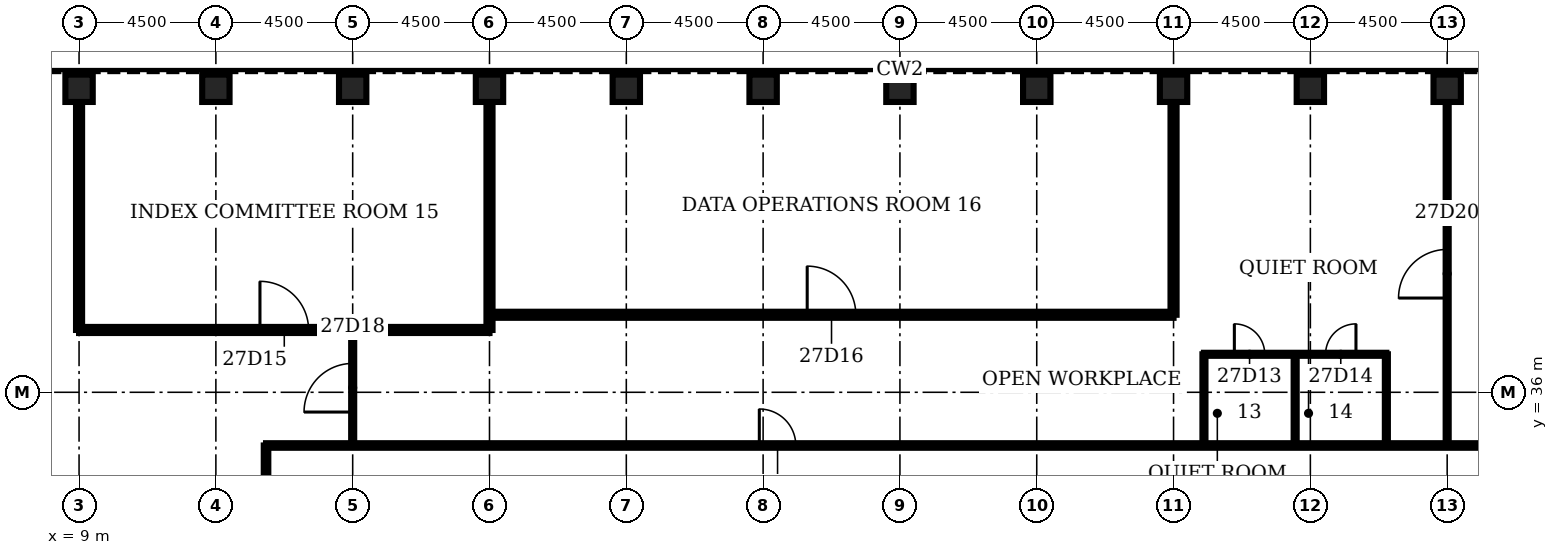
"""IFC4 building model, lengths in metres.
Left out: names, types, materials, properties, quantities, classifications, styles, units other than length and angle.
Written with IfcOpenShell. Run it as: python <this file> out.ifc"""

import sys

from ifc_helpers import new_model, si_unit, direction, frame, frame_2d, origin, origin_2d, place, context, subcontext, project, spatial, rectangle, hollow_rectangle, extrude, element, fill, save


model = new_model("IFC4")
c1 = context("Model", 3, precision=1e-05, world=origin(), true_north=direction((0.0, 1.0)))
c2 = subcontext(c1, "Body", "Model", "MODEL_VIEW")
j1 = project(units=[si_unit("LENGTHUNIT", "METRE"), si_unit("PLANEANGLEUNIT", "RADIAN")], contexts=[c1])
p1 = place(None, origin())
s1 = spatial("IfcSite", under=j1, at=p1, CompositionType="ELEMENT")
p2 = place(p1, origin())
s2 = spatial("IfcBuilding", under=s1, at=p2, CompositionType="ELEMENT")
p3 = place(p2, frame((0.0, 0.0, 125.7)))
s3 = spatial("IfcBuildingStorey", under=s2, at=p3, CompositionType="ELEMENT", Elevation=125.7)
for number, where, z_axis, x_axis in (
    (1, (54.0, 46.0, 0.0), (0.0, 0.0, 1.0), (0.0, 1.0, 0.0)),
    (2, (49.5, 46.0, 0.0), (0.0, 0.0, 1.0), (0.0, 1.0, 0.0)),
    (3, (45.0, 46.0, 0.0), (0.0, 0.0, 1.0), (0.0, 1.0, 0.0)),
    (4, (40.5, 46.0, 0.0), (0.0, 0.0, 1.0), (0.0, 1.0, 0.0)),
    (5, (36.0, 46.0, 0.0), (0.0, 0.0, 1.0), (0.0, 1.0, 0.0)),
    (6, (31.5, 46.0, 0.0), (0.0, 0.0, 1.0), (0.0, 1.0, 0.0)),
    (7, (27.0, 46.0, 0.0), (0.0, 0.0, 1.0), (0.0, 1.0, 0.0)),
    (8, (22.5, 46.0, 0.0), (0.0, 0.0, 1.0), (0.0, 1.0, 0.0)),
    (9, (18.0, 46.0, 0.0), (0.0, 0.0, 1.0), (0.0, 1.0, 0.0)),
    (10, (13.5, 46.0, 0.0), (0.0, 0.0, 1.0), (0.0, 1.0, 0.0)),
    (11, (9.0, 46.0, 0.0), (0.0, 0.0, 1.0), (0.0, 1.0, 0.0)),
):
    element("IfcColumn", number, at=place(p3, frame(where, z_axis=z_axis, x_axis=x_axis)), inside=s3, PredefinedType="COLUMN", context=c2, shape_type="SweptSolid", body=[
        extrude(hollow_rectangle(XDim=0.9, YDim=0.9, WallThickness=0.1, at=origin_2d()), origin(), (0.0, 0.0, 1.0), 4.2),
    ])
p4 = place(p3, frame((15.15, 34.25, 0.0), z_axis=(0.0, 0.0, 1.0), x_axis=(1.0, 0.0, 0.0)))
e12 = element("IfcWall", 12, at=p4, inside=s3, PredefinedType="PARTITIONING", context=c2, shape_type="SweptSolid", body=[
    extrude(rectangle(XDim=41.7, YDim=0.15, at=frame_2d((20.85, 0.0))), origin(), (0.0, 0.0, 1.0), 3.0),
])
p5 = place(p4, frame((16.225, 0.0, 0.0)))
e13 = element("IfcOpeningElement", 13, at=p5, cuts=e12, PredefinedType="OPENING", context=c2, shape_type="SweptSolid", body=[
    extrude(rectangle(XDim=1.2, YDim=2.1, at=frame_2d((0.6, 1.05))), frame((0.0, 0.085, 0.0), z_axis=(0.0, -1.0, 0.0), x_axis=(1.0, 0.0, 0.0)), (0.0, 0.0, 1.0), 0.17),
])
p6 = place(p3, frame((46.0, 37.25, 0.0), z_axis=(0.0, 0.0, 1.0), x_axis=(1.0, 0.0, 0.0)))
e14 = element("IfcWall", 14, at=p6, inside=s3, PredefinedType="PARTITIONING", context=c2, shape_type="SweptSolid", body=[
    extrude(rectangle(XDim=6.0, YDim=0.1, at=frame_2d((3.0, 0.0))), origin(), (0.0, 0.0, 1.0), 3.0),
])
p7 = place(p6, frame((1.0, 0.0, 0.0)))
e15 = element("IfcOpeningElement", 15, at=p7, cuts=e14, PredefinedType="OPENING", context=c2, shape_type="SweptSolid", body=[
    extrude(rectangle(XDim=1.0, YDim=2.1, at=frame_2d((0.5, 1.05))), frame((0.0, 0.06, 0.0), z_axis=(0.0, -1.0, 0.0), x_axis=(1.0, 0.0, 0.0)), (0.0, 0.0, 1.0), 0.12),
])
p8 = place(p6, frame((4.0, 0.0, 0.0)))
e16 = element("IfcOpeningElement", 16, at=p8, cuts=e14, PredefinedType="OPENING", context=c2, shape_type="SweptSolid", body=[
    extrude(rectangle(XDim=1.0, YDim=2.1, at=frame_2d((0.5, 1.05))), frame((0.0, 0.06, 0.0), z_axis=(0.0, -1.0, 0.0), x_axis=(1.0, 0.0, 0.0)), (0.0, 0.0, 1.0), 0.12),
])
p9 = place(p3, frame((9.0, 38.05, 0.0), z_axis=(0.0, 0.0, 1.0), x_axis=(1.0, 0.0, 0.0)))
e17 = element("IfcWall", 17, at=p9, inside=s3, PredefinedType="PARTITIONING", context=c2, shape_type="SweptSolid", body=[
    extrude(rectangle(XDim=13.5, YDim=0.2, at=frame_2d((6.75, 0.0))), origin(), (0.0, 0.0, 1.0), 3.0),
])
p10 = place(p9, frame((5.95, 0.0, 0.0)))
e18 = element("IfcOpeningElement", 18, at=p10, cuts=e17, PredefinedType="OPENING", context=c2, shape_type="SweptSolid", body=[
    extrude(rectangle(XDim=1.6, YDim=2.1, at=frame_2d((0.8, 1.05))), frame((0.0, 0.11, 0.0), z_axis=(0.0, -1.0, 0.0), x_axis=(1.0, 0.0, 0.0)), (0.0, 0.0, 1.0), 0.22),
])
p11 = place(p3, frame((22.5, 38.55, 0.0), z_axis=(0.0, 0.0, 1.0), x_axis=(1.0, 0.0, 0.0)))
e19 = element("IfcWall", 19, at=p11, inside=s3, PredefinedType="PARTITIONING", context=c2, shape_type="SweptSolid", body=[
    extrude(rectangle(XDim=22.5, YDim=0.2, at=frame_2d((11.25, 0.0))), origin(), (0.0, 0.0, 1.0), 3.0),
])
p12 = place(p11, frame((10.45, 0.0, 0.0)))
e20 = element("IfcOpeningElement", 20, at=p12, cuts=e19, PredefinedType="OPENING", context=c2, shape_type="SweptSolid", body=[
    extrude(rectangle(XDim=1.6, YDim=2.1, at=frame_2d((0.8, 1.05))), frame((0.0, 0.11, 0.0), z_axis=(0.0, -1.0, 0.0), x_axis=(1.0, 0.0, 0.0)), (0.0, 0.0, 1.0), 0.22),
])
p13 = place(p3, frame((9.0, 38.05, 0.0), z_axis=(0.0, 0.0, 1.0), x_axis=(0.0, 1.0, 0.0)))
e21 = element("IfcWall", 21, at=p13, inside=s3, PredefinedType="PARTITIONING", context=c2, shape_type="SweptSolid", body=[
    extrude(rectangle(XDim=7.5, YDim=0.2, at=frame_2d((3.75, 0.0))), origin(), (0.0, 0.0, 1.0), 3.0),
])
p14 = place(p3, frame((15.15, 13.75, 0.0), z_axis=(0.0, 0.0, 1.0), x_axis=(0.0, 1.0, 0.0)))
e22 = element("IfcWall", 22, at=p14, inside=s3, PredefinedType="PARTITIONING", context=c2, shape_type="SweptSolid", body=[
    extrude(rectangle(XDim=20.5, YDim=0.15, at=frame_2d((10.25, 0.0))), origin(), (0.0, 0.0, 1.0), 3.0),
])
p15 = place(p14, frame((9.65, 0.0, 0.0)))
e23 = element("IfcOpeningElement", 23, at=p15, cuts=e22, PredefinedType="OPENING", context=c2, shape_type="SweptSolid", body=[
    extrude(rectangle(XDim=1.2, YDim=2.1, at=frame_2d((0.6, 1.05))), frame((0.0, 0.085, 0.0), z_axis=(0.0, -1.0, 0.0), x_axis=(1.0, 0.0, 0.0)), (0.0, 0.0, 1.0), 0.17),
])
p16 = place(p3, frame((18.0, 34.25, 0.0), z_axis=(0.0, 0.0, 1.0), x_axis=(0.0, 1.0, 0.0)))
e24 = element("IfcWall", 24, at=p16, inside=s3, PredefinedType="PARTITIONING", context=c2, shape_type="SweptSolid", body=[
    extrude(rectangle(XDim=3.8, YDim=0.1, at=frame_2d((1.9, 0.0))), origin(), (0.0, 0.0, 1.0), 3.0),
])
p17 = place(p16, frame((1.1, 0.0, 0.0)))
e25 = element("IfcOpeningElement", 25, at=p17, cuts=e24, PredefinedType="OPENING", context=c2, shape_type="SweptSolid", body=[
    extrude(rectangle(XDim=1.6, YDim=2.1, at=frame_2d((0.8, 1.05))), frame((0.0, 0.06, 0.0), z_axis=(0.0, -1.0, 0.0), x_axis=(1.0, 0.0, 0.0)), (0.0, 0.0, 1.0), 0.12),
])
p18 = place(p3, frame((22.5, 38.05, 0.0), z_axis=(0.0, 0.0, 1.0), x_axis=(0.0, 1.0, 0.0)))
e26 = element("IfcWall", 26, at=p18, inside=s3, PredefinedType="PARTITIONING", context=c2, shape_type="SweptSolid", body=[
    extrude(rectangle(XDim=7.5, YDim=0.2, at=frame_2d((3.75, 0.0))), origin(), (0.0, 0.0, 1.0), 3.0),
])
p19 = place(p3, frame((45.0, 38.55, 0.0), z_axis=(0.0, 0.0, 1.0), x_axis=(0.0, 1.0, 0.0)))
e27 = element("IfcWall", 27, at=p19, inside=s3, PredefinedType="PARTITIONING", context=c2, shape_type="SweptSolid", body=[
    extrude(rectangle(XDim=7.0, YDim=0.2, at=frame_2d((3.5, 0.0))), origin(), (0.0, 0.0, 1.0), 3.0),
])
for number, where, z_axis, x_axis in (
    (28, (46.0, 34.25, 0.0), (0.0, 0.0, 1.0), (0.0, 1.0, 0.0)),
    (29, (49.0, 34.25, 0.0), (0.0, 0.0, 1.0), (0.0, 1.0, 0.0)),
    (30, (52.0, 34.25, 0.0), (0.0, 0.0, 1.0), (0.0, 1.0, 0.0)),
):
    element("IfcWall", number, at=place(p3, frame(where, z_axis=z_axis, x_axis=x_axis)), inside=s3, PredefinedType="PARTITIONING", context=c2, shape_type="SweptSolid", body=[
        extrude(rectangle(XDim=3.0, YDim=0.1, at=frame_2d((1.5, 0.0))), origin(), (0.0, 0.0, 1.0), 3.0),
    ])
p20 = place(p3, frame((54.0, 34.25, 0.0), z_axis=(0.0, 0.0, 1.0), x_axis=(0.0, 1.0, 0.0)))
e31 = element("IfcWall", 31, at=p20, inside=s3, PredefinedType="PARTITIONING", context=c2, shape_type="SweptSolid", body=[
    extrude(rectangle(XDim=11.3, YDim=0.1, at=frame_2d((5.65, 0.0))), origin(), (0.0, 0.0, 1.0), 3.0),
])
p21 = place(p20, frame((4.85, 0.0, 0.0)))
e32 = element("IfcOpeningElement", 32, at=p21, cuts=e31, PredefinedType="OPENING", context=c2, shape_type="SweptSolid", body=[
    extrude(rectangle(XDim=1.6, YDim=2.1, at=frame_2d((0.8, 1.05))), frame((0.0, 0.06, 0.0), z_axis=(0.0, -1.0, 0.0), x_axis=(1.0, 0.0, 0.0)), (0.0, 0.0, 1.0), 0.12),
])
p22 = place(p7, origin())
e33 = element("IfcDoor", 33, at=p22, inside=s3, OperationType="SINGLE_SWING_LEFT", PredefinedType="DOOR", context=c2, shape_type="SweptSolid", body=[
    extrude(rectangle(XDim=1.0, YDim=2.1, at=frame_2d((0.5, 1.05))), frame((0.0, 0.025, 0.0), z_axis=(0.0, -1.0, 0.0), x_axis=(1.0, 0.0, 0.0)), (0.0, 0.0, 1.0), 0.05),
])
fill(e15, e33)
p23 = place(p8, origin())
e34 = element("IfcDoor", 34, at=p23, inside=s3, OperationType="SINGLE_SWING_RIGHT", PredefinedType="DOOR", context=c2, shape_type="SweptSolid", body=[
    extrude(rectangle(XDim=1.0, YDim=2.1, at=frame_2d((0.5, 1.05))), frame((0.0, 0.025, 0.0), z_axis=(0.0, -1.0, 0.0), x_axis=(1.0, 0.0, 0.0)), (0.0, 0.0, 1.0), 0.05),
])
fill(e16, e34)
p24 = place(p10, origin())
e35 = element("IfcDoor", 35, at=p24, inside=s3, OperationType="SINGLE_SWING_LEFT", PredefinedType="DOOR", context=c2, shape_type="SweptSolid", body=[
    extrude(rectangle(XDim=1.6, YDim=2.1, at=frame_2d((0.8, 1.05))), frame((0.0, 0.025, 0.0), z_axis=(0.0, -1.0, 0.0), x_axis=(1.0, 0.0, 0.0)), (0.0, 0.0, 1.0), 0.05),
])
fill(e18, e35)
p25 = place(p12, origin())
e36 = element("IfcDoor", 36, at=p25, inside=s3, OperationType="SINGLE_SWING_LEFT", PredefinedType="DOOR", context=c2, shape_type="SweptSolid", body=[
    extrude(rectangle(XDim=1.6, YDim=2.1, at=frame_2d((0.8, 1.05))), frame((0.0, 0.025, 0.0), z_axis=(0.0, -1.0, 0.0), x_axis=(1.0, 0.0, 0.0)), (0.0, 0.0, 1.0), 0.05),
])
fill(e20, e36)
p26 = place(p17, origin())
e37 = element("IfcDoor", 37, at=p26, inside=s3, OperationType="SINGLE_SWING_LEFT", PredefinedType="DOOR", context=c2, shape_type="SweptSolid", body=[
    extrude(rectangle(XDim=1.6, YDim=2.1, at=frame_2d((0.8, 1.05))), frame((0.0, 0.025, 0.0), z_axis=(0.0, -1.0, 0.0), x_axis=(1.0, 0.0, 0.0)), (0.0, 0.0, 1.0), 0.05),
])
fill(e25, e37)
p27 = place(p21, origin())
e38 = element("IfcDoor", 38, at=p27, inside=s3, OperationType="SINGLE_SWING_LEFT", PredefinedType="DOOR", context=c2, shape_type="SweptSolid", body=[
    extrude(rectangle(XDim=1.6, YDim=2.1, at=frame_2d((0.8, 1.05))), frame((0.0, 0.025, 0.0), z_axis=(0.0, -1.0, 0.0), x_axis=(1.0, 0.0, 0.0)), (0.0, 0.0, 1.0), 0.05),
])
fill(e32, e38)
p28 = place(p5, origin())
e39 = element("IfcDoor", 39, at=p28, inside=s3, OperationType="SINGLE_SWING_LEFT", PredefinedType="DOOR", context=c2, shape_type="SweptSolid", body=[
    extrude(rectangle(XDim=1.2, YDim=2.1, at=frame_2d((0.6, 1.05))), frame((0.0, 0.025, 0.0), z_axis=(0.0, -1.0, 0.0), x_axis=(1.0, 0.0, 0.0)), (0.0, 0.0, 1.0), 0.05),
])
fill(e13, e39)
save(model, sys.argv[1])
